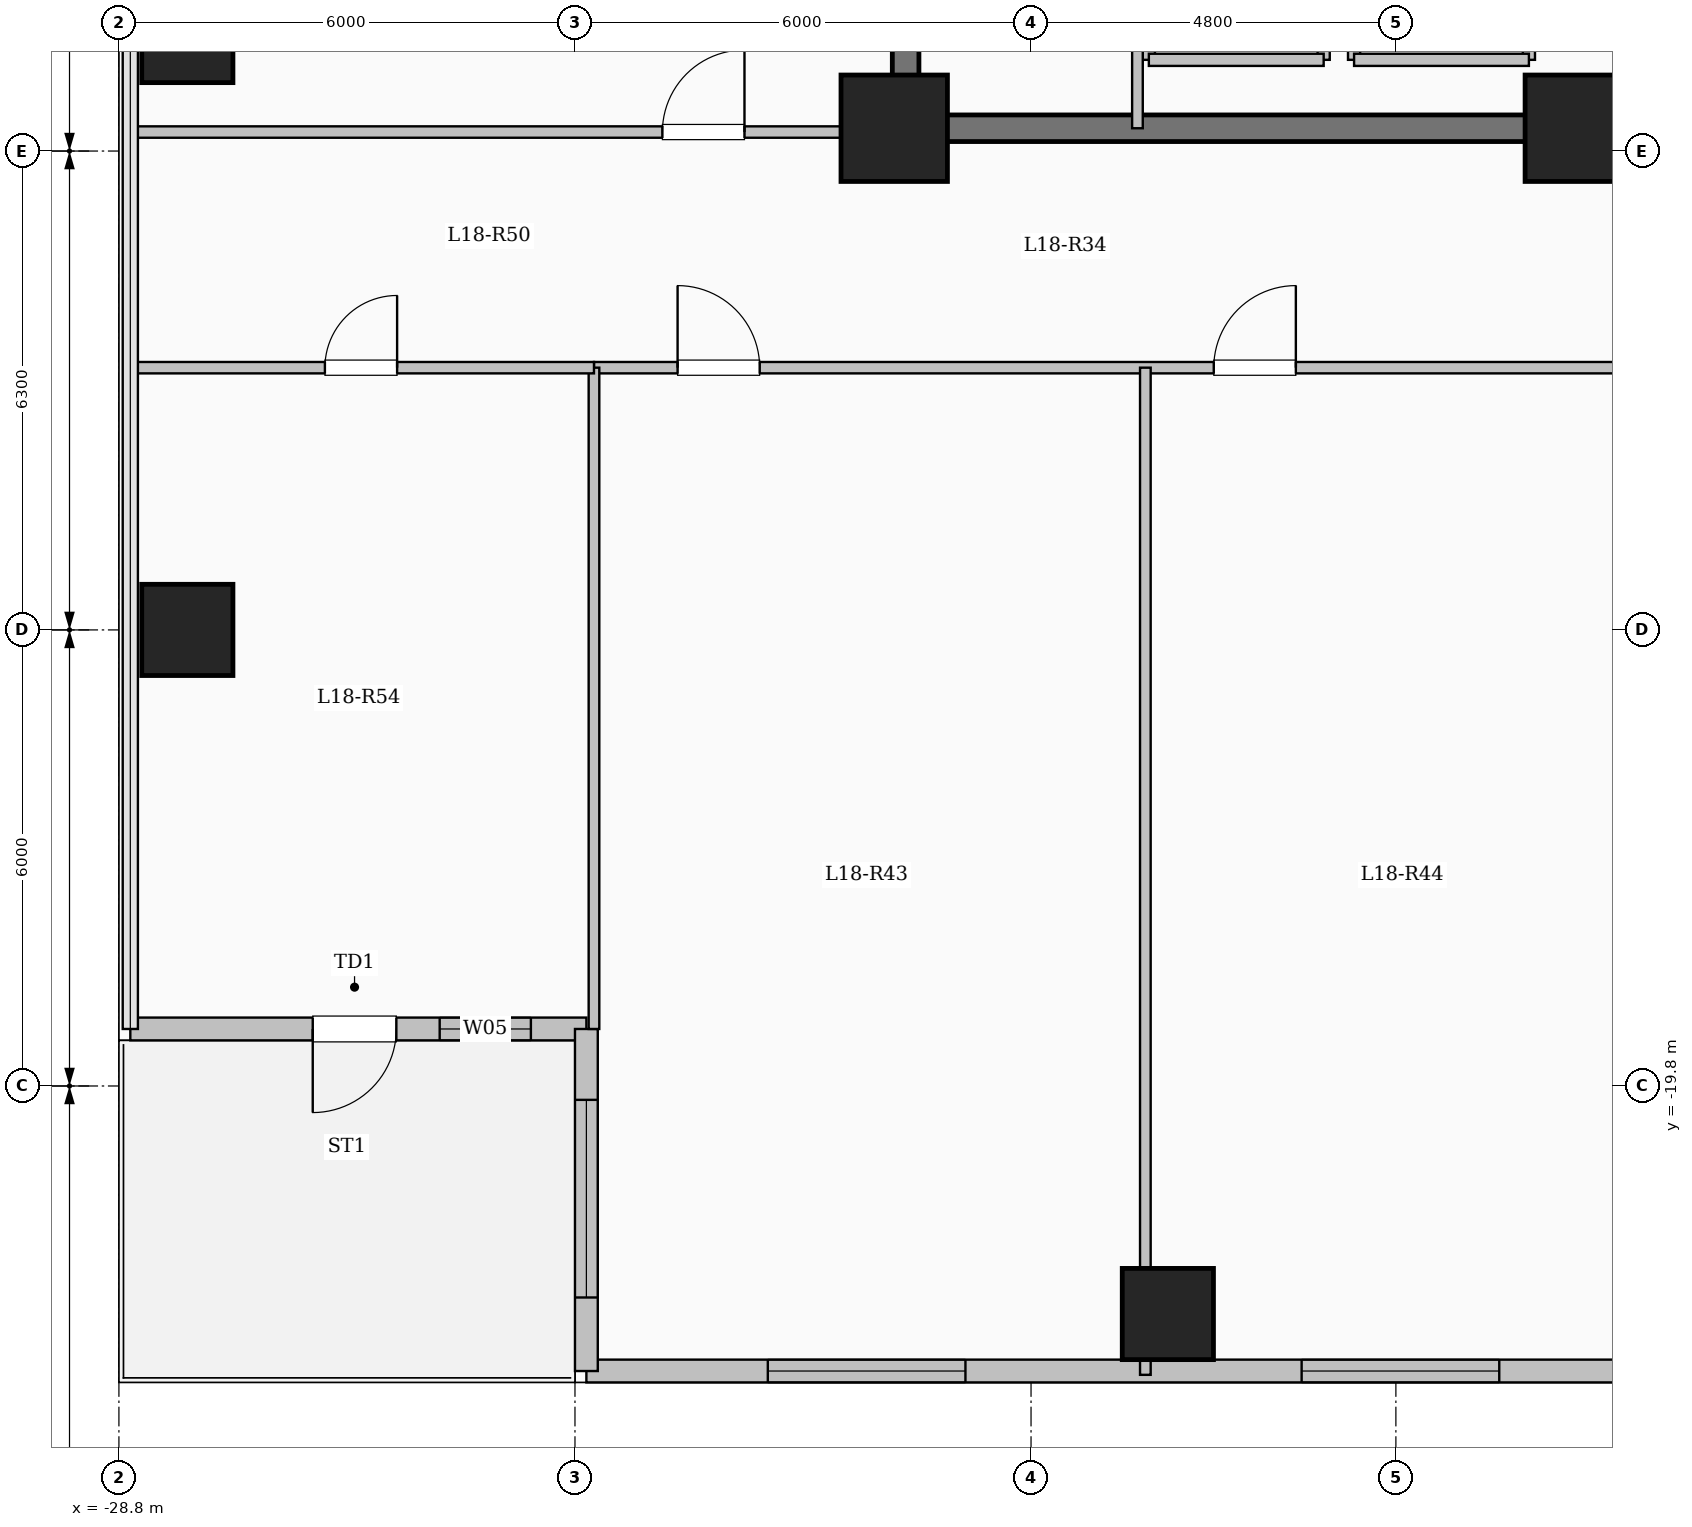
"""IFC4 building model, lengths in metres.
Left out: names, types, materials, properties, quantities, classifications, styles, units other than length and angle.
Written with IfcOpenShell. Run it as: python <this file> out.ifc"""

import sys

from ifc_helpers import new_model, si_unit, direction, frame, frame_2d, origin, origin_2d, place, context, subcontext, project, spatial, rectangle, extrude, element, fill, save


model = new_model("IFC4")
c1 = context("Model", 3, precision=1e-05, world=origin(), true_north=direction((0.0, 1.0)))
c2 = subcontext(c1, "Body", "Model", "MODEL_VIEW")
j1 = project(units=[si_unit("LENGTHUNIT", "METRE"), si_unit("PLANEANGLEUNIT", "RADIAN")], contexts=[c1])
p1 = place(None, origin())
s1 = spatial("IfcSite", under=j1, at=p1, CompositionType="ELEMENT")
p2 = place(p1, origin())
s2 = spatial("IfcBuilding", under=s1, at=p2, CompositionType="ELEMENT")
p3 = place(p2, frame((0.0, 0.0, 68.7)))
s3 = spatial("IfcBuildingStorey", under=s2, at=p3, CompositionType="ELEMENT", Elevation=68.7)
for number, where, z_axis, x_axis in (
    (1, (-9.6, -7.2, 0.0), (0.0, 0.0, 1.0), (1.0, 0.0, 0.0)),
    (2, (-18.6, -7.2, 0.0), (0.0, 0.0, 1.0), (1.0, 0.0, 0.0)),
):
    element("IfcColumn", number, at=place(p3, frame(where, z_axis=z_axis, x_axis=x_axis)), inside=s3, PredefinedType="COLUMN", context=c2, shape_type="SweptSolid", body=[
        extrude(rectangle(XDim=1.4, YDim=1.4, at=origin_2d()), origin(), (0.0, 0.0, 1.0), 4.5),
    ])
for number, where, z_axis, x_axis in (
    (3, (-15.0, -22.8, 0.0), (0.0, 0.0, 1.0), (1.0, 0.0, 0.0)),
    (4, (-27.9, -13.8, 0.0), (0.0, 0.0, 1.0), (1.0, 0.0, 0.0)),
    (5, (-27.9, -6.0, 0.0), (0.0, 0.0, 1.0), (1.0, 0.0, 0.0)),
):
    element("IfcColumn", number, at=place(p3, frame(where, z_axis=z_axis, x_axis=x_axis)), inside=s3, PredefinedType="COLUMN", context=c2, shape_type="SweptSolid", body=[
        extrude(rectangle(XDim=1.2, YDim=1.2, at=origin_2d()), origin(), (0.0, 0.0, 1.0), 4.5),
    ])
p4 = place(p3, frame((-22.65, -19.05, 0.0), z_axis=(0.0, 0.0, 1.0), x_axis=(-1.0, 0.0, 0.0)))
e6 = element("IfcWall", 6, at=p4, inside=s3, PredefinedType="SOLIDWALL", context=c2, shape_type="SweptSolid", body=[
    extrude(rectangle(XDim=6.0, YDim=0.3, at=frame_2d((3.0, 0.0))), origin(), (0.0, 0.0, 1.0), 4.2),
])
p5 = place(p4, frame((2.5, 0.0, 0.0)))
e7 = element("IfcOpeningElement", 7, at=p5, cuts=e6, PredefinedType="OPENING", context=c2, shape_type="SweptSolid", body=[
    extrude(rectangle(XDim=1.1, YDim=2.2, at=frame_2d((0.55, 1.1))), frame((0.0, 0.16, 0.0), z_axis=(0.0, -1.0, 0.0), x_axis=(1.0, 0.0, 0.0)), (0.0, 0.0, 1.0), 0.32),
])
p6 = place(p4, frame((0.73, 0.0, 0.95)))
e8 = element("IfcOpeningElement", 8, at=p6, cuts=e6, PredefinedType="OPENING", context=c2, shape_type="SweptSolid", body=[
    extrude(rectangle(XDim=1.2, YDim=1.5, at=frame_2d((0.6, 0.75))), frame((0.0, 0.16, 0.0), z_axis=(0.0, -1.0, 0.0), x_axis=(1.0, 0.0, 0.0)), (0.0, 0.0, 1.0), 0.32),
])
p7 = place(p3, frame((-7.35, -23.55, 0.0), z_axis=(0.0, 0.0, 1.0), x_axis=(-1.0, 0.0, 0.0)))
e9 = element("IfcWall", 9, at=p7, inside=s3, PredefinedType="SOLIDWALL", context=c2, shape_type="SweptSolid", body=[
    extrude(rectangle(XDim=15.3, YDim=0.3, at=frame_2d((7.65, 0.0))), origin(), (0.0, 0.0, 1.0), 4.2),
])
p8 = place(p7, frame((0.147, 0.0, 0.95)))
e10 = element("IfcOpeningElement", 10, at=p8, cuts=e9, PredefinedType="OPENING", context=c2, shape_type="SweptSolid", body=[
    extrude(rectangle(XDim=0.85, YDim=1.5, at=frame_2d((0.425, 0.75))), frame((0.0, 0.16, 0.0), z_axis=(0.0, -1.0, 0.0), x_axis=(1.0, 0.0, 0.0)), (0.0, 0.0, 1.0), 0.32),
])
p9 = place(p7, frame((3.29, 0.0, 0.85)))
e11 = element("IfcOpeningElement", 11, at=p9, cuts=e9, PredefinedType="OPENING", context=c2, shape_type="SweptSolid", body=[
    extrude(rectangle(XDim=2.6, YDim=2.4, at=frame_2d((1.3, 1.2))), frame((0.0, 0.16, 0.0), z_axis=(0.0, -1.0, 0.0), x_axis=(1.0, 0.0, 0.0)), (0.0, 0.0, 1.0), 0.32),
])
p10 = place(p7, frame((10.313, 0.0, 0.85)))
e12 = element("IfcOpeningElement", 12, at=p10, cuts=e9, PredefinedType="OPENING", context=c2, shape_type="SweptSolid", body=[
    extrude(rectangle(XDim=2.6, YDim=2.4, at=frame_2d((1.3, 1.2))), frame((0.0, 0.16, 0.0), z_axis=(0.0, -1.0, 0.0), x_axis=(1.0, 0.0, 0.0)), (0.0, 0.0, 1.0), 0.32),
])
p11 = place(p3, frame((-22.65, -23.55, 0.0), z_axis=(0.0, 0.0, 1.0), x_axis=(0.0, 1.0, 0.0)))
e13 = element("IfcWall", 13, at=p11, inside=s3, PredefinedType="SOLIDWALL", context=c2, shape_type="SweptSolid", body=[
    extrude(rectangle(XDim=4.5, YDim=0.3, at=frame_2d((2.25, 0.0))), origin(), (0.0, 0.0, 1.0), 4.2),
])
p12 = place(p11, frame((0.968, 0.0, 0.85)))
e14 = element("IfcOpeningElement", 14, at=p12, cuts=e13, PredefinedType="OPENING", context=c2, shape_type="SweptSolid", body=[
    extrude(rectangle(XDim=2.6, YDim=2.4, at=frame_2d((1.3, 1.2))), frame((0.0, 0.16, 0.0), z_axis=(0.0, -1.0, 0.0), x_axis=(1.0, 0.0, 0.0)), (0.0, 0.0, 1.0), 0.32),
])
p13 = place(p3, frame((-12.55, -6.3, 0.0), z_axis=(0.0, 0.0, 1.0), x_axis=(0.0, 1.0, 0.0)))
e15 = element("IfcWall", 15, at=p13, inside=s3, PredefinedType="SOLIDWALL", context=c2, shape_type="SweptSolid", body=[
    extrude(rectangle(XDim=2.6, YDim=0.16, at=frame_2d((1.3, 0.0))), origin(), (0.0, 0.0, 1.0), 4.2),
])
p14 = place(p3, frame((-10.25, -6.3, 0.0), z_axis=(0.0, 0.0, 1.0), x_axis=(0.0, 1.0, 0.0)))
e16 = element("IfcWall", 16, at=p14, inside=s3, PredefinedType="SOLIDWALL", context=c2, shape_type="SweptSolid", body=[
    extrude(rectangle(XDim=2.6, YDim=0.16, at=frame_2d((1.3, 0.0))), origin(), (0.0, 0.0, 1.0), 4.2),
])
p15 = place(p14, frame((0.75, 0.0, 0.0)))
e17 = element("IfcOpeningElement", 17, at=p15, cuts=e16, PredefinedType="OPENING", context=c2, shape_type="SweptSolid", body=[
    extrude(rectangle(XDim=1.1, YDim=2.15, at=frame_2d((0.55, 1.075))), frame((0.0, 0.09, 0.0), z_axis=(0.0, -1.0, 0.0), x_axis=(1.0, 0.0, 0.0)), (0.0, 0.0, 1.0), 0.18),
])
p16 = place(p3, frame((-12.55, -6.3, 0.0), z_axis=(0.0, 0.0, 1.0), x_axis=(1.0, 0.0, 0.0)))
e18 = element("IfcWall", 18, at=p16, inside=s3, PredefinedType="SOLIDWALL", context=c2, shape_type="SweptSolid", body=[
    extrude(rectangle(XDim=2.3, YDim=0.16, at=frame_2d((1.15, 0.0))), origin(), (0.0, 0.0, 1.0), 4.2),
])
for number, where, z_axis, x_axis in (
    (19, (-15.25, -6.3, 0.0), (0.0, 0.0, 1.0), (0.0, 1.0, 0.0)),
    (20, (-12.95, -6.3, 0.0), (0.0, 0.0, 1.0), (0.0, 1.0, 0.0)),
):
    element("IfcWall", number, at=place(p3, frame(where, z_axis=z_axis, x_axis=x_axis)), inside=s3, PredefinedType="SOLIDWALL", context=c2, shape_type="SweptSolid", body=[
        extrude(rectangle(XDim=2.6, YDim=0.16, at=frame_2d((1.3, 0.0))), origin(), (0.0, 0.0, 1.0), 4.2),
    ])
p17 = place(p3, frame((-15.25, -6.3, 0.0), z_axis=(0.0, 0.0, 1.0), x_axis=(1.0, 0.0, 0.0)))
e21 = element("IfcWall", 21, at=p17, inside=s3, PredefinedType="SOLIDWALL", context=c2, shape_type="SweptSolid", body=[
    extrude(rectangle(XDim=2.3, YDim=0.16, at=frame_2d((1.15, 0.0))), origin(), (0.0, 0.0, 1.0), 4.2),
])
p18 = place(p3, frame((-18.45, -7.375, 0.0), z_axis=(0.0, 0.0, 1.0), x_axis=(0.0, 1.0, 0.0)))
e22 = element("IfcWall", 22, at=p18, inside=s3, PredefinedType="SHEAR", context=c2, shape_type="SweptSolid", body=[
    extrude(rectangle(XDim=14.05, YDim=0.35, at=frame_2d((7.025, 0.0))), origin(), (0.0, 0.0, 1.0), 4.5),
])
p19 = place(p3, frame((-18.625, -7.2, 0.0), z_axis=(0.0, 0.0, 1.0), x_axis=(1.0, 0.0, 0.0)))
e23 = element("IfcWall", 23, at=p19, inside=s3, PredefinedType="SHEAR", context=c2, shape_type="SweptSolid", body=[
    extrude(rectangle(XDim=8.55, YDim=0.35, at=frame_2d((4.275, 0.0))), origin(), (0.0, 0.0, 1.0), 4.5),
])
p20 = place(p3, frame((-15.4, -7.2, 0.0), z_axis=(0.0, 0.0, 1.0), x_axis=(0.0, 1.0, 0.0)))
e24 = element("IfcWall", 24, at=p20, inside=s3, PredefinedType="PARTITIONING", context=c2, shape_type="SweptSolid", body=[
    extrude(rectangle(XDim=10.45, YDim=0.14, at=frame_2d((5.225, 0.0))), origin(), (0.0, 0.0, 1.0), 4.2),
])
p21 = place(p20, frame((9.25, 0.0, 0.0)))
e25 = element("IfcOpeningElement", 25, at=p21, cuts=e24, PredefinedType="OPENING", context=c2, shape_type="SweptSolid", body=[
    extrude(rectangle(XDim=0.9, YDim=2.08, at=frame_2d((0.45, 1.04))), frame((0.0, 0.08, 0.0), z_axis=(0.0, -1.0, 0.0), x_axis=(1.0, 0.0, 0.0)), (0.0, 0.0, 1.0), 0.16),
])
p22 = place(p3, frame((-22.55, -10.35, 0.0), z_axis=(0.0, 0.0, 1.0), x_axis=(1.0, 0.0, 0.0)))
e26 = element("IfcWall", 26, at=p22, inside=s3, PredefinedType="PARTITIONING", context=c2, shape_type="SweptSolid", body=[
    extrude(rectangle(XDim=14.0, YDim=0.15, at=frame_2d((7.0, 0.0))), origin(), (0.0, 0.0, 1.0), 4.2),
])
p23 = place(p22, frame((1.1, 0.0, 0.0)))
e27 = element("IfcOpeningElement", 27, at=p23, cuts=e26, PredefinedType="OPENING", context=c2, shape_type="SweptSolid", body=[
    extrude(rectangle(XDim=1.08, YDim=2.15, at=frame_2d((0.54, 1.075))), frame((0.0, 0.085, 0.0), z_axis=(0.0, -1.0, 0.0), x_axis=(1.0, 0.0, 0.0)), (0.0, 0.0, 1.0), 0.17),
])
p24 = place(p22, frame((8.154, 0.0, 0.0)))
e28 = element("IfcOpeningElement", 28, at=p24, cuts=e26, PredefinedType="OPENING", context=c2, shape_type="SweptSolid", body=[
    extrude(rectangle(XDim=1.08, YDim=2.15, at=frame_2d((0.54, 1.075))), frame((0.0, 0.085, 0.0), z_axis=(0.0, -1.0, 0.0), x_axis=(1.0, 0.0, 0.0)), (0.0, 0.0, 1.0), 0.17),
])
p25 = place(p3, frame((-15.296, -23.6, 0.0), z_axis=(0.0, 0.0, 1.0), x_axis=(0.0, 1.0, 0.0)))
e29 = element("IfcWall", 29, at=p25, inside=s3, PredefinedType="PARTITIONING", context=c2, shape_type="SweptSolid", body=[
    extrude(rectangle(XDim=13.25, YDim=0.14, at=frame_2d((6.625, 0.0))), origin(), (0.0, 0.0, 1.0), 3.535),
])
p26 = place(p3, frame((-28.68, -7.25, 0.0), z_axis=(0.0, 0.0, 1.0), x_axis=(1.0, 0.0, 0.0)))
e30 = element("IfcWall", 30, at=p26, inside=s3, PredefinedType="PARTITIONING", context=c2, shape_type="SweptSolid", body=[
    extrude(rectangle(XDim=10.23, YDim=0.15, at=frame_2d((5.115, 0.0))), origin(), (0.0, 0.0, 1.0), 4.2),
])
p27 = place(p26, frame((7.03, 0.0, 0.0)))
e31 = element("IfcOpeningElement", 31, at=p27, cuts=e30, PredefinedType="OPENING", context=c2, shape_type="SweptSolid", body=[
    extrude(rectangle(XDim=1.08, YDim=2.15, at=frame_2d((0.54, 1.075))), frame((0.0, 0.085, 0.0), z_axis=(0.0, -1.0, 0.0), x_axis=(1.0, 0.0, 0.0)), (0.0, 0.0, 1.0), 0.17),
])
p28 = place(p3, frame((-22.55, -19.05, 0.0), z_axis=(0.0, 0.0, 1.0), x_axis=(0.0, 1.0, 0.0)))
e32 = element("IfcWall", 32, at=p28, inside=s3, PredefinedType="PARTITIONING", context=c2, shape_type="SweptSolid", body=[
    extrude(rectangle(XDim=8.7, YDim=0.14, at=frame_2d((4.35, 0.0))), origin(), (0.0, 0.0, 1.0), 4.2),
])
p29 = place(p3, frame((-28.68, -10.35, 0.0), z_axis=(0.0, 0.0, 1.0), x_axis=(1.0, 0.0, 0.0)))
e33 = element("IfcWall", 33, at=p29, inside=s3, PredefinedType="PARTITIONING", context=c2, shape_type="SweptSolid", body=[
    extrude(rectangle(XDim=6.13, YDim=0.15, at=frame_2d((3.065, 0.0))), origin(), (0.0, 0.0, 1.0), 4.2),
])
p30 = place(p29, frame((2.59, 0.0, 0.0)))
e34 = element("IfcOpeningElement", 34, at=p30, cuts=e33, PredefinedType="OPENING", context=c2, shape_type="SweptSolid", body=[
    extrude(rectangle(XDim=0.95, YDim=2.15, at=frame_2d((0.475, 1.075))), frame((0.0, 0.085, 0.0), z_axis=(0.0, -1.0, 0.0), x_axis=(1.0, 0.0, 0.0)), (0.0, 0.0, 1.0), 0.17),
])
p31 = place(p5, origin())
e35 = element("IfcDoor", 35, at=p31, inside=s3, OperationType="SINGLE_SWING_RIGHT", PredefinedType="DOOR", context=c2, shape_type="SweptSolid", body=[
    extrude(rectangle(XDim=1.1, YDim=2.2, at=frame_2d((0.55, 1.1))), frame((0.0, 0.025, 0.0), z_axis=(0.0, -1.0, 0.0), x_axis=(1.0, 0.0, 0.0)), (0.0, 0.0, 1.0), 0.05),
])
fill(e7, e35)
p32 = place(p6, origin())
e36 = element("IfcWindow", 36, at=p32, inside=s3, PartitioningType="SINGLE_PANEL", PredefinedType="WINDOW", context=c2, shape_type="SweptSolid", body=[
    extrude(rectangle(XDim=1.2, YDim=1.5, at=frame_2d((0.6, 0.75))), frame((0.0, 0.03, 0.0), z_axis=(0.0, -1.0, 0.0), x_axis=(1.0, 0.0, 0.0)), (0.0, 0.0, 1.0), 0.06),
])
fill(e8, e36)
p33 = place(p9, origin())
e37 = element("IfcWindow", 37, at=p33, inside=s3, PartitioningType="SINGLE_PANEL", PredefinedType="WINDOW", context=c2, shape_type="SweptSolid", body=[
    extrude(rectangle(XDim=2.6, YDim=2.4, at=frame_2d((1.3, 1.2))), frame((0.0, 0.03, 0.0), z_axis=(0.0, -1.0, 0.0), x_axis=(1.0, 0.0, 0.0)), (0.0, 0.0, 1.0), 0.06),
])
fill(e11, e37)
p34 = place(p10, origin())
e38 = element("IfcWindow", 38, at=p34, inside=s3, PartitioningType="SINGLE_PANEL", PredefinedType="WINDOW", context=c2, shape_type="SweptSolid", body=[
    extrude(rectangle(XDim=2.6, YDim=2.4, at=frame_2d((1.3, 1.2))), frame((0.0, 0.03, 0.0), z_axis=(0.0, -1.0, 0.0), x_axis=(1.0, 0.0, 0.0)), (0.0, 0.0, 1.0), 0.06),
])
fill(e12, e38)
p35 = place(p12, origin())
e39 = element("IfcWindow", 39, at=p35, inside=s3, PartitioningType="SINGLE_PANEL", PredefinedType="WINDOW", context=c2, shape_type="SweptSolid", body=[
    extrude(rectangle(XDim=2.6, YDim=2.4, at=frame_2d((1.3, 1.2))), frame((0.0, 0.03, 0.0), z_axis=(0.0, -1.0, 0.0), x_axis=(1.0, 0.0, 0.0)), (0.0, 0.0, 1.0), 0.06),
])
fill(e14, e39)
p36 = place(p23, origin())
e40 = element("IfcDoor", 40, at=p36, inside=s3, OperationType="SINGLE_SWING_LEFT", PredefinedType="DOOR", context=c2, shape_type="SweptSolid", body=[
    extrude(rectangle(XDim=1.08, YDim=2.15, at=frame_2d((0.54, 1.075))), frame((0.0, 0.025, 0.0), z_axis=(0.0, -1.0, 0.0), x_axis=(1.0, 0.0, 0.0)), (0.0, 0.0, 1.0), 0.05),
])
fill(e27, e40)
p37 = place(p24, origin())
e41 = element("IfcDoor", 41, at=p37, inside=s3, OperationType="SINGLE_SWING_RIGHT", PredefinedType="DOOR", context=c2, shape_type="SweptSolid", body=[
    extrude(rectangle(XDim=1.08, YDim=2.15, at=frame_2d((0.54, 1.075))), frame((0.0, 0.025, 0.0), z_axis=(0.0, -1.0, 0.0), x_axis=(1.0, 0.0, 0.0)), (0.0, 0.0, 1.0), 0.05),
])
fill(e28, e41)
p38 = place(p30, origin())
e42 = element("IfcDoor", 42, at=p38, inside=s3, OperationType="SINGLE_SWING_RIGHT", PredefinedType="DOOR", context=c2, shape_type="SweptSolid", body=[
    extrude(rectangle(XDim=0.95, YDim=2.15, at=frame_2d((0.475, 1.075))), frame((0.0, 0.025, 0.0), z_axis=(0.0, -1.0, 0.0), x_axis=(1.0, 0.0, 0.0)), (0.0, 0.0, 1.0), 0.05),
])
fill(e34, e42)
p39 = place(p27, origin())
e43 = element("IfcDoor", 43, at=p39, inside=s3, OperationType="SINGLE_SWING_RIGHT", PredefinedType="DOOR", context=c2, shape_type="SweptSolid", body=[
    extrude(rectangle(XDim=1.08, YDim=2.15, at=frame_2d((0.54, 1.075))), frame((0.0, 0.025, 0.0), z_axis=(0.0, -1.0, 0.0), x_axis=(1.0, 0.0, 0.0)), (0.0, 0.0, 1.0), 0.05),
])
fill(e31, e43)
save(model, sys.argv[1])
